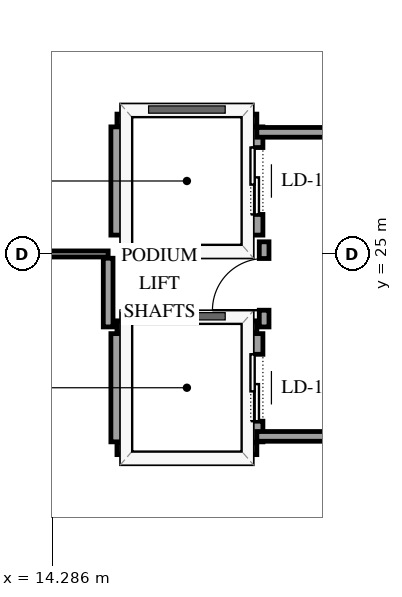
"""IFC4 building model, lengths in metres.
Left out: names, types, materials, properties, quantities, classifications, styles, units other than length and angle.
Written with IfcOpenShell. Run it as: python <this file> out.ifc"""

import sys

from ifc_helpers import new_model, si_unit, direction, frame, frame_2d, origin, place, context, subcontext, project, spatial, rectangle, extrude, element, fill, save


model = new_model("IFC4")
c1 = context("Model", 3, precision=1e-05, world=origin(), true_north=direction((0.0, 1.0)))
c2 = subcontext(c1, "Body", "Model", "MODEL_VIEW")
j1 = project(units=[si_unit("LENGTHUNIT", "METRE"), si_unit("PLANEANGLEUNIT", "RADIAN")], contexts=[c1])
p1 = place(None, origin())
s1 = spatial("IfcSite", under=j1, at=p1, CompositionType="ELEMENT")
p2 = place(p1, origin())
s2 = spatial("IfcBuilding", under=s1, at=p2, CompositionType="ELEMENT")
p3 = place(p2, frame((0.0, 0.0, -10.2)))
s3 = spatial("IfcBuildingStorey", under=s2, at=p3, CompositionType="ELEMENT", Elevation=-10.2)
for number, where, z_axis, x_axis in (
    (1, (15.35, 21.8, 0.0), (0.0, 0.0, 1.0), (1.0, 0.0, 0.0)),
    (2, (15.35, 23.8, 0.0), (0.0, 0.0, 1.0), (1.0, 0.0, 0.0)),
):
    element("IfcWall", number, at=place(p3, frame(where, z_axis=z_axis, x_axis=x_axis)), inside=s3, PredefinedType="SOLIDWALL", context=c2, shape_type="SweptSolid", body=[
        extrude(rectangle(XDim=2.3, YDim=0.2, at=frame_2d((1.15, 0.0))), origin(), (0.0, 0.0, 1.0), 4.44),
    ])
p4 = place(p3, frame((15.35, 21.91, 0.0), z_axis=(0.0, 0.0, 1.0), x_axis=(0.0, 1.0, 0.0)))
e3 = element("IfcWall", 3, at=p4, inside=s3, PredefinedType="SOLIDWALL", context=c2, shape_type="SweptSolid", body=[
    extrude(rectangle(XDim=1.78, YDim=0.2, at=frame_2d((0.89, 0.0))), origin(), (0.0, 0.0, 1.0), 4.44),
])
p5 = place(p3, frame((17.65, 21.91, 0.0), z_axis=(0.0, 0.0, 1.0), x_axis=(0.0, 1.0, 0.0)))
e4 = element("IfcWall", 4, at=p5, inside=s3, PredefinedType="SOLIDWALL", context=c2, shape_type="SweptSolid", body=[
    extrude(rectangle(XDim=1.78, YDim=0.2, at=frame_2d((0.89, 0.0))), origin(), (0.0, 0.0, 1.0), 4.44),
])
p6 = place(p5, frame((0.34, 0.0, 0.0)))
e5 = element("IfcOpeningElement", 5, at=p6, cuts=e4, PredefinedType="OPENING", context=c2, shape_type="SweptSolid", body=[
    extrude(rectangle(XDim=1.1, YDim=2.15, at=frame_2d((0.55, 1.075))), frame((0.0, 0.11, 0.0), z_axis=(0.0, -1.0, 0.0), x_axis=(1.0, 0.0, 0.0)), (0.0, 0.0, 1.0), 0.22),
])
p7 = place(p3, frame((15.35, 27.2, 0.0), z_axis=(0.0, 0.0, 1.0), x_axis=(1.0, 0.0, 0.0)))
e6 = element("IfcWall", 6, at=p7, inside=s3, PredefinedType="SOLIDWALL", context=c2, shape_type="SweptSolid", body=[
    extrude(rectangle(XDim=2.3, YDim=0.2, at=frame_2d((1.15, 0.0))), origin(), (0.0, 0.0, 1.0), 4.44),
])
p8 = place(p3, frame((15.35, 25.31, 0.0), z_axis=(0.0, 0.0, 1.0), x_axis=(0.0, 1.0, 0.0)))
e7 = element("IfcWall", 7, at=p8, inside=s3, PredefinedType="SOLIDWALL", context=c2, shape_type="SweptSolid", body=[
    extrude(rectangle(XDim=1.78, YDim=0.2, at=frame_2d((0.89, 0.0))), origin(), (0.0, 0.0, 1.0), 4.44),
])
p9 = place(p3, frame((17.65, 25.31, 0.0), z_axis=(0.0, 0.0, 1.0), x_axis=(0.0, 1.0, 0.0)))
e8 = element("IfcWall", 8, at=p9, inside=s3, PredefinedType="SOLIDWALL", context=c2, shape_type="SweptSolid", body=[
    extrude(rectangle(XDim=1.78, YDim=0.2, at=frame_2d((0.89, 0.0))), origin(), (0.0, 0.0, 1.0), 4.44),
])
p10 = place(p9, frame((0.34, 0.0, 0.0)))
e9 = element("IfcOpeningElement", 9, at=p10, cuts=e8, PredefinedType="OPENING", context=c2, shape_type="SweptSolid", body=[
    extrude(rectangle(XDim=1.1, YDim=2.15, at=frame_2d((0.55, 1.075))), frame((0.0, 0.11, 0.0), z_axis=(0.0, -1.0, 0.0), x_axis=(1.0, 0.0, 0.0)), (0.0, 0.0, 1.0), 0.22),
])
p11 = place(p3, frame((0.0, 25.0, 0.0), z_axis=(0.0, 0.0, 1.0), x_axis=(1.0, 0.0, 0.0)))
e10 = element("IfcWall", 10, at=p11, inside=s3, PredefinedType="PARTITIONING", context=c2, shape_type="SweptSolid", body=[
    extrude(rectangle(XDim=15.205, YDim=0.1, at=frame_2d((7.603, 0.0))), origin(), (0.0, 0.0, 1.0), 3.491),
])
p12 = place(p3, frame((30.53, 22.0, 0.0), z_axis=(0.0, 0.0, 1.0), x_axis=(-1.0, 0.0, 0.0)))
e11 = element("IfcWall", 11, at=p12, inside=s3, PredefinedType="PARTITIONING", context=c2, shape_type="SweptSolid", body=[
    extrude(rectangle(XDim=12.88, YDim=0.16, at=frame_2d((6.44, 0.0))), origin(), (0.0, 0.0, 1.0), 4.44),
])
p13 = place(p3, frame((17.65, 27.0, 0.0), z_axis=(0.0, 0.0, 1.0), x_axis=(1.0, 0.0, 0.0)))
e12 = element("IfcWall", 12, at=p13, inside=s3, PredefinedType="PARTITIONING", context=c2, shape_type="SweptSolid", body=[
    extrude(rectangle(XDim=12.88, YDim=0.16, at=frame_2d((6.44, 0.0))), origin(), (0.0, 0.0, 1.0), 4.44),
])
p14 = place(p13, frame((5.965, 0.0, 0.0)))
e13 = element("IfcOpeningElement", 13, at=p14, cuts=e12, PredefinedType="OPENING", context=c2, shape_type="SweptSolid", body=[
    extrude(rectangle(XDim=0.95, YDim=2.15, at=frame_2d((0.475, 1.075))), frame((0.0, 0.09, 0.0), z_axis=(0.0, -1.0, 0.0), x_axis=(1.0, 0.0, 0.0)), (0.0, 0.0, 1.0), 0.18),
])
p15 = place(p3, frame((17.77, 23.8, 0.0), z_axis=(0.0, 0.0, 1.0), x_axis=(0.0, 1.0, 0.0)))
e14 = element("IfcWall", 14, at=p15, inside=s3, PredefinedType="PARTITIONING", context=c2, shape_type="SweptSolid", body=[
    extrude(rectangle(XDim=1.4, YDim=0.16, at=frame_2d((0.7, 0.0))), origin(), (0.0, 0.0, 1.0), 4.44),
])
p16 = place(p15, frame((0.275, 0.0, 0.0)))
e15 = element("IfcOpeningElement", 15, at=p16, cuts=e14, PredefinedType="OPENING", context=c2, shape_type="SweptSolid", body=[
    extrude(rectangle(XDim=0.85, YDim=2.1, at=frame_2d((0.425, 1.05))), frame((0.0, 0.09, 0.0), z_axis=(0.0, -1.0, 0.0), x_axis=(1.0, 0.0, 0.0)), (0.0, 0.0, 1.0), 0.18),
])
p17 = place(p3, frame((15.205, 23.8, 0.0), z_axis=(0.0, 0.0, 1.0), x_axis=(0.0, 1.0, 0.0)))
e16 = element("IfcWall", 16, at=p17, inside=s3, PredefinedType="PARTITIONING", context=c2, shape_type="SweptSolid", body=[
    extrude(rectangle(XDim=1.13, YDim=0.16, at=frame_2d((0.565, 0.0))), origin(), (0.0, 0.0, 1.0), 4.44),
])
p18 = place(p6, origin())
e17 = element("IfcDoor", 17, at=p18, inside=s3, OperationType="SLIDING_TO_LEFT", PredefinedType="DOOR", context=c2, shape_type="SweptSolid", body=[
    extrude(rectangle(XDim=1.1, YDim=2.15, at=frame_2d((0.55, 1.075))), frame((0.0, 0.025, 0.0), z_axis=(0.0, -1.0, 0.0), x_axis=(1.0, 0.0, 0.0)), (0.0, 0.0, 1.0), 0.05),
])
fill(e5, e17)
p19 = place(p10, origin())
e18 = element("IfcDoor", 18, at=p19, inside=s3, OperationType="SLIDING_TO_LEFT", PredefinedType="DOOR", context=c2, shape_type="SweptSolid", body=[
    extrude(rectangle(XDim=1.1, YDim=2.15, at=frame_2d((0.55, 1.075))), frame((0.0, 0.025, 0.0), z_axis=(0.0, -1.0, 0.0), x_axis=(1.0, 0.0, 0.0)), (0.0, 0.0, 1.0), 0.05),
])
fill(e9, e18)
p20 = place(p16, origin())
e19 = element("IfcDoor", 19, at=p20, inside=s3, OperationType="SINGLE_SWING_LEFT", PredefinedType="DOOR", context=c2, shape_type="SweptSolid", body=[
    extrude(rectangle(XDim=0.85, YDim=2.1, at=frame_2d((0.425, 1.05))), frame((0.0, 0.025, 0.0), z_axis=(0.0, -1.0, 0.0), x_axis=(1.0, 0.0, 0.0)), (0.0, 0.0, 1.0), 0.05),
])
fill(e15, e19)
save(model, sys.argv[1])
